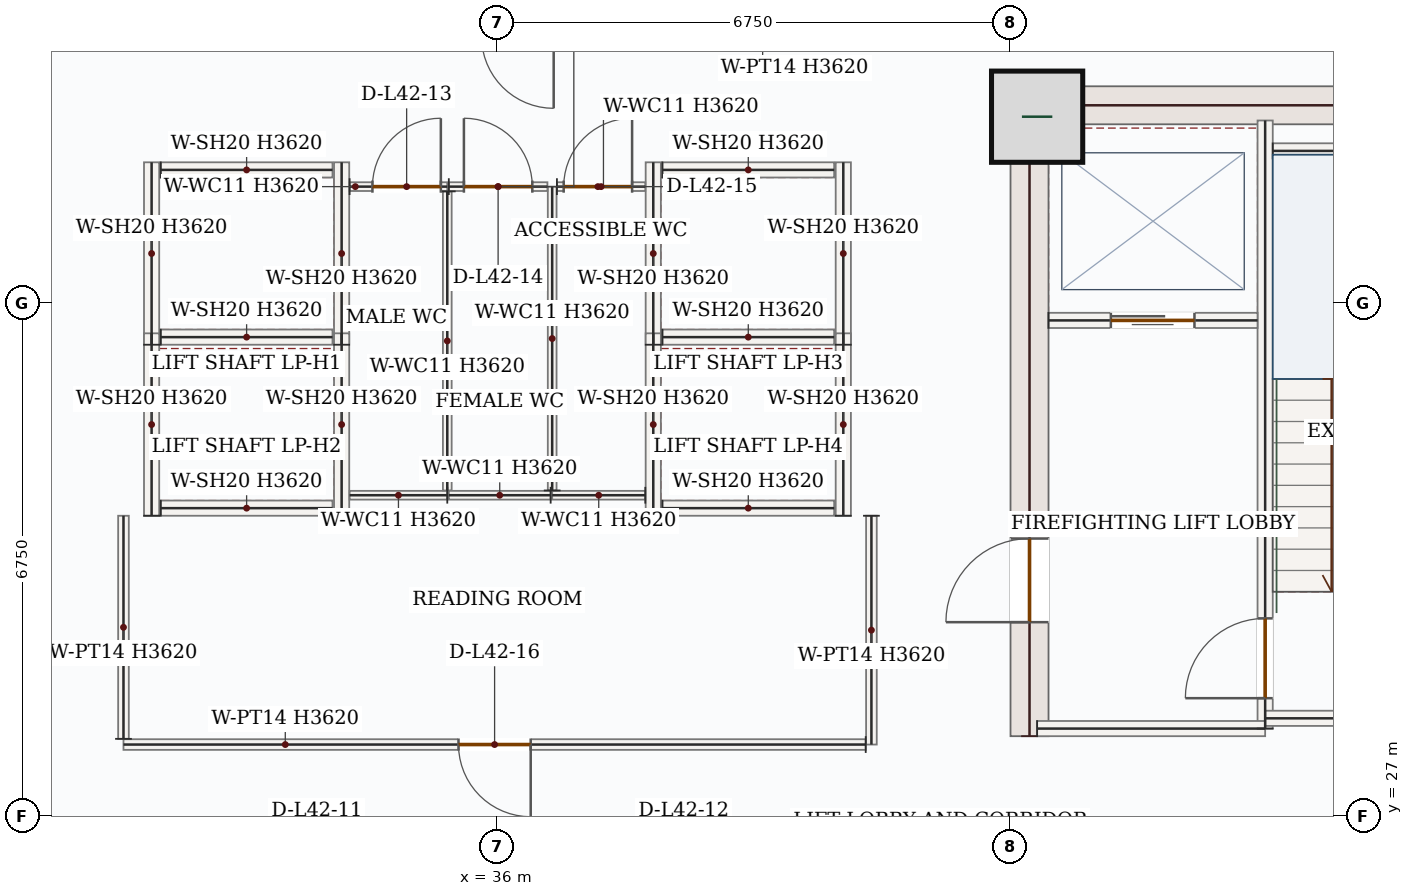
"""IFC4 building model, lengths in metres.
Left out: names, types, materials, properties, quantities, classifications, styles, units other than length and angle.
Written with IfcOpenShell. Run it as: python <this file> out.ifc"""

import sys

from ifc_helpers import new_model, si_unit, direction, frame, frame_2d, origin, origin_2d, place, context, subcontext, project, spatial, rectangle, extrude, source, transform, mapped, element, fill, save


model = new_model("IFC4")
c1 = context("Model", 3, precision=1e-05, world=origin(), true_north=direction((0.0, 1.0)))
c2 = subcontext(c1, "Body", "Model", "MODEL_VIEW")
j1 = project(units=[si_unit("LENGTHUNIT", "METRE"), si_unit("PLANEANGLEUNIT", "RADIAN")], contexts=[c1])
p1 = place(None, origin())
s1 = spatial("IfcSite", under=j1, at=p1, CompositionType="ELEMENT")
p2 = place(p1, origin())
s2 = spatial("IfcBuilding", under=s1, at=p2, CompositionType="ELEMENT")
p3 = place(p2, frame((0.0, 0.0, 182.4)))
s3 = spatial("IfcBuildingStorey", under=s2, at=p3, CompositionType="ELEMENT", Elevation=182.4)
p4 = place(p3, frame((43.0, 28.05, 0.0), z_axis=(0.0, 0.0, 1.0), x_axis=(0.0, 1.0, 0.0)))
e1 = element("IfcWall", 1, at=p4, inside=s3, PredefinedType="SHEAR", context=c2, shape_type="SweptSolid", body=[
    extrude(rectangle(XDim=8.55, YDim=0.5, at=frame_2d((4.275, 0.0))), origin(), (0.0, 0.0, 1.0), 3.62),
])
p5 = place(p4, frame((1.5, 0.0, 0.0)))
e2 = element("IfcOpeningElement", 2, at=p5, cuts=e1, PredefinedType="OPENING", context=c2, shape_type="SweptSolid", body=[
    extrude(rectangle(XDim=1.1, YDim=2.2, at=frame_2d((0.55, 1.1))), frame((0.0, 0.26, 0.0), z_axis=(0.0, -1.0, 0.0), x_axis=(1.0, 0.0, 0.0)), (0.0, 0.0, 1.0), 0.52),
])
m1 = source(origin(), c2, "Body", "SweptSolid", [
    extrude(rectangle(XDim=7.0, YDim=0.5, at=frame_2d((3.5, 0.0))), origin(), (0.0, 0.0, 1.0), 3.62),
])
p6 = place(p3, frame((43.25, 36.35, 0.0), z_axis=(0.0, 0.0, 1.0), x_axis=(1.0, 0.0, 0.0)))
e3 = element("IfcWall", 3, at=p6, inside=s3, PredefinedType="SHEAR", context=c2, shape_type="MappedRepresentation", body=[
    mapped(m1, transform((0.0, 0.0, 0.0), x_axis=(1.0, 0.0, 0.0), y_axis=(0.0, 1.0, 0.0), z_axis=(0.0, 0.0, 1.0), scale=1.0)),
])
m2 = source(origin(), c2, "Body", "SweptSolid", [
    extrude(rectangle(XDim=1.2, YDim=1.2, at=origin_2d()), origin(), (0.0, 0.0, 1.0), 3.9),
])
p7 = place(p3, frame((43.1, 36.2, 0.0), z_axis=(0.0, 0.0, 1.0), x_axis=(1.0, 0.0, 0.0)))
e4 = element("IfcColumn", 4, at=p7, inside=s3, PredefinedType="COLUMN", context=c2, shape_type="MappedRepresentation", body=[
    mapped(m2, transform((0.0, 0.0, 0.0), x_axis=(1.0, 0.0, 0.0), y_axis=(0.0, 1.0, 0.0), z_axis=(0.0, 0.0, 1.0), scale=1.0)),
])
p8 = place(p3, frame((46.1, 28.15, 0.0), z_axis=(0.0, 0.0, 1.0), x_axis=(0.0, 1.0, 0.0)))
e5 = element("IfcWall", 5, at=p8, inside=s3, PredefinedType="SOLIDWALL", context=c2, shape_type="SweptSolid", body=[
    extrude(rectangle(XDim=8.0, YDim=0.2, at=frame_2d((4.0, 0.0))), origin(), (0.0, 0.0, 1.0), 3.62),
])
p9 = place(p8, frame((0.4, 0.0, 0.0)))
e6 = element("IfcOpeningElement", 6, at=p9, cuts=e5, PredefinedType="OPENING", context=c2, shape_type="SweptSolid", body=[
    extrude(rectangle(XDim=1.05, YDim=2.15, at=frame_2d((0.525, 1.075))), frame((0.0, 0.11, 0.0), z_axis=(0.0, -1.0, 0.0), x_axis=(1.0, 0.0, 0.0)), (0.0, 0.0, 1.0), 0.22),
])
m3 = source(origin(), c2, "Body", "SweptSolid", [
    extrude(rectangle(XDim=3.0, YDim=0.2, at=frame_2d((1.5, 0.0))), origin(), (0.0, 0.0, 1.0), 3.62),
])
p10 = place(p3, frame((43.1, 28.15, 0.0), z_axis=(0.0, 0.0, 1.0), x_axis=(1.0, 0.0, 0.0)))
e7 = element("IfcWall", 7, at=p10, inside=s3, PredefinedType="SOLIDWALL", context=c2, shape_type="MappedRepresentation", body=[
    mapped(m3, transform((0.0, 0.0, 0.0), x_axis=(1.0, 0.0, 0.0), y_axis=(0.0, 1.0, 0.0), z_axis=(0.0, 0.0, 1.0), scale=1.0)),
])
m4 = source(origin(), c2, "Body", "SweptSolid", [
    extrude(rectangle(XDim=4.25, YDim=0.2, at=frame_2d((2.125, 0.0))), origin(), (0.0, 0.0, 1.0), 3.62),
])
p11 = place(p3, frame((46.1, 28.285, 0.0), z_axis=(0.0, 0.0, 1.0), x_axis=(1.0, 0.0, 0.0)))
e8 = element("IfcWall", 8, at=p11, inside=s3, PredefinedType="SOLIDWALL", context=c2, shape_type="MappedRepresentation", body=[
    mapped(m4, transform((0.0, 0.0, 0.0), x_axis=(1.0, 0.0, 0.0), y_axis=(0.0, 1.0, 0.0), z_axis=(0.0, 0.0, 1.0), scale=1.0)),
])
m5 = source(origin(), c2, "Body", "SweptSolid", [
    extrude(rectangle(XDim=3.25, YDim=0.2, at=frame_2d((1.625, 0.0))), origin(), (0.0, 0.0, 1.0), 3.62),
])
p12 = place(p3, frame((46.2, 35.75, 0.0), z_axis=(0.0, 0.0, 1.0), x_axis=(1.0, 0.0, 0.0)))
e9 = element("IfcWall", 9, at=p12, inside=s3, PredefinedType="SOLIDWALL", context=c2, shape_type="MappedRepresentation", body=[
    mapped(m5, transform((0.0, 0.0, 0.0), x_axis=(1.0, 0.0, 0.0), y_axis=(0.0, 1.0, 0.0), z_axis=(0.0, 0.0, 1.0), scale=1.0)),
])
p13 = place(p3, frame((43.25, 33.52, 0.0), z_axis=(0.0, 0.0, 1.0), x_axis=(1.0, 0.0, 0.0)))
e10 = element("IfcWall", 10, at=p13, inside=s3, PredefinedType="SOLIDWALL", context=c2, shape_type="SweptSolid", body=[
    extrude(rectangle(XDim=2.75, YDim=0.2, at=frame_2d((1.375, 0.0))), origin(), (0.0, 0.0, 1.0), 3.62),
])
p14 = place(p13, frame((0.82, 0.0, 0.0)))
e11 = element("IfcOpeningElement", 11, at=p14, cuts=e10, PredefinedType="OPENING", context=c2, shape_type="SweptSolid", body=[
    extrude(rectangle(XDim=1.1, YDim=2.15, at=frame_2d((0.55, 1.075))), frame((0.0, 0.11, 0.0), z_axis=(0.0, -1.0, 0.0), x_axis=(1.0, 0.0, 0.0)), (0.0, 0.0, 1.0), 0.22),
])
m6 = source(origin(), c2, "Body", "SweptSolid", [
    extrude(rectangle(XDim=2.4, YDim=0.2, at=frame_2d((1.2, 0.0))), origin(), (0.0, 0.0, 1.0), 3.62),
])
for number, where, z_axis, x_axis in (
    (12, (31.45, 33.2, 0.0), (0.0, 0.0, 1.0), (0.0, 1.0, 0.0)),
    (13, (33.95, 33.2, 0.0), (0.0, 0.0, 1.0), (0.0, 1.0, 0.0)),
):
    element("IfcWall", number, at=place(p3, frame(where, z_axis=z_axis, x_axis=x_axis)), inside=s3, PredefinedType="SOLIDWALL", context=c2, shape_type="MappedRepresentation", body=[
        mapped(m6, transform((0.0, 0.0, 0.0), x_axis=(1.0, 0.0, 0.0), y_axis=(0.0, 1.0, 0.0), z_axis=(0.0, 0.0, 1.0), scale=1.0)),
    ])
m7 = source(origin(), c2, "Body", "SweptSolid", [
    extrude(rectangle(XDim=2.26, YDim=0.2, at=frame_2d((1.13, 0.0))), origin(), (0.0, 0.0, 1.0), 3.62),
])
for number, where, z_axis, x_axis in (
    (14, (31.57, 33.3, 0.0), (0.0, 0.0, 1.0), (1.0, 0.0, 0.0)),
    (15, (31.57, 35.5, 0.0), (0.0, 0.0, 1.0), (1.0, 0.0, 0.0)),
):
    element("IfcWall", number, at=place(p3, frame(where, z_axis=z_axis, x_axis=x_axis)), inside=s3, PredefinedType="SOLIDWALL", context=c2, shape_type="MappedRepresentation", body=[
        mapped(m7, transform((0.0, 0.0, 0.0), x_axis=(1.0, 0.0, 0.0), y_axis=(0.0, 1.0, 0.0), z_axis=(0.0, 0.0, 1.0), scale=1.0)),
    ])
for number, where, z_axis, x_axis in (
    (16, (31.45, 30.95, 0.0), (0.0, 0.0, 1.0), (0.0, 1.0, 0.0)),
    (17, (33.95, 30.95, 0.0), (0.0, 0.0, 1.0), (0.0, 1.0, 0.0)),
):
    element("IfcWall", number, at=place(p3, frame(where, z_axis=z_axis, x_axis=x_axis)), inside=s3, PredefinedType="SOLIDWALL", context=c2, shape_type="MappedRepresentation", body=[
        mapped(m6, transform((0.0, 0.0, 0.0), x_axis=(1.0, 0.0, 0.0), y_axis=(0.0, 1.0, 0.0), z_axis=(0.0, 0.0, 1.0), scale=1.0)),
    ])
p15 = place(p3, frame((31.57, 31.05, 0.0), z_axis=(0.0, 0.0, 1.0), x_axis=(1.0, 0.0, 0.0)))
e18 = element("IfcWall", 18, at=p15, inside=s3, PredefinedType="SOLIDWALL", context=c2, shape_type="MappedRepresentation", body=[
    mapped(m7, transform((0.0, 0.0, 0.0), x_axis=(1.0, 0.0, 0.0), y_axis=(0.0, 1.0, 0.0), z_axis=(0.0, 0.0, 1.0), scale=1.0)),
])
for number, where, z_axis, x_axis in (
    (19, (38.05, 33.2, 0.0), (0.0, 0.0, 1.0), (0.0, 1.0, 0.0)),
    (20, (40.55, 33.2, 0.0), (0.0, 0.0, 1.0), (0.0, 1.0, 0.0)),
):
    element("IfcWall", number, at=place(p3, frame(where, z_axis=z_axis, x_axis=x_axis)), inside=s3, PredefinedType="SOLIDWALL", context=c2, shape_type="MappedRepresentation", body=[
        mapped(m6, transform((0.0, 0.0, 0.0), x_axis=(1.0, 0.0, 0.0), y_axis=(0.0, 1.0, 0.0), z_axis=(0.0, 0.0, 1.0), scale=1.0)),
    ])
for number, where, z_axis, x_axis in (
    (21, (38.17, 33.3, 0.0), (0.0, 0.0, 1.0), (1.0, 0.0, 0.0)),
    (22, (38.17, 35.5, 0.0), (0.0, 0.0, 1.0), (1.0, 0.0, 0.0)),
):
    element("IfcWall", number, at=place(p3, frame(where, z_axis=z_axis, x_axis=x_axis)), inside=s3, PredefinedType="SOLIDWALL", context=c2, shape_type="MappedRepresentation", body=[
        mapped(m7, transform((0.0, 0.0, 0.0), x_axis=(1.0, 0.0, 0.0), y_axis=(0.0, 1.0, 0.0), z_axis=(0.0, 0.0, 1.0), scale=1.0)),
    ])
for number, where, z_axis, x_axis in (
    (23, (38.05, 30.95, 0.0), (0.0, 0.0, 1.0), (0.0, 1.0, 0.0)),
    (24, (40.55, 30.95, 0.0), (0.0, 0.0, 1.0), (0.0, 1.0, 0.0)),
):
    element("IfcWall", number, at=place(p3, frame(where, z_axis=z_axis, x_axis=x_axis)), inside=s3, PredefinedType="SOLIDWALL", context=c2, shape_type="MappedRepresentation", body=[
        mapped(m6, transform((0.0, 0.0, 0.0), x_axis=(1.0, 0.0, 0.0), y_axis=(0.0, 1.0, 0.0), z_axis=(0.0, 0.0, 1.0), scale=1.0)),
    ])
p16 = place(p3, frame((38.17, 31.05, 0.0), z_axis=(0.0, 0.0, 1.0), x_axis=(1.0, 0.0, 0.0)))
e25 = element("IfcWall", 25, at=p16, inside=s3, PredefinedType="SOLIDWALL", context=c2, shape_type="MappedRepresentation", body=[
    mapped(m7, transform((0.0, 0.0, 0.0), x_axis=(1.0, 0.0, 0.0), y_axis=(0.0, 1.0, 0.0), z_axis=(0.0, 0.0, 1.0), scale=1.0)),
])
m8 = source(origin(), c2, "Body", "SweptSolid", [
    extrude(rectangle(XDim=1.225, YDim=0.115, at=frame_2d((0.613, 0.0))), origin(), (0.0, 0.0, 1.0), 3.62),
])
p17 = place(p3, frame((37.945, 31.22, 0.0), z_axis=(0.0, 0.0, 1.0), x_axis=(-1.0, 0.0, 0.0)))
e26 = element("IfcWall", 26, at=p17, inside=s3, PredefinedType="PARTITIONING", context=c2, shape_type="MappedRepresentation", body=[
    mapped(m8, transform((0.0, 0.0, 0.0), x_axis=(1.0, 0.0, 0.0), y_axis=(0.0, 1.0, 0.0), z_axis=(0.0, 0.0, 1.0), scale=1.0)),
])
m9 = source(origin(), c2, "Body", "SweptSolid", [
    extrude(rectangle(XDim=3.998, YDim=0.115, at=frame_2d((1.999, 0.0))), origin(), (0.0, 0.0, 1.0), 3.62),
])
p18 = place(p3, frame((36.72, 31.282, 0.0), z_axis=(0.0, 0.0, 1.0), x_axis=(0.0, 1.0, 0.0)))
e27 = element("IfcWall", 27, at=p18, inside=s3, PredefinedType="PARTITIONING", context=c2, shape_type="MappedRepresentation", body=[
    mapped(m9, transform((0.0, 0.0, 0.0), x_axis=(1.0, 0.0, 0.0), y_axis=(0.0, 1.0, 0.0), z_axis=(0.0, 0.0, 1.0), scale=1.0)),
])
p19 = place(p3, frame((36.782, 35.28, 0.0), z_axis=(0.0, 0.0, 1.0), x_axis=(1.0, 0.0, 0.0)))
e28 = element("IfcWall", 28, at=p19, inside=s3, PredefinedType="PARTITIONING", context=c2, shape_type="SweptSolid", body=[
    extrude(rectangle(XDim=1.163, YDim=0.115, at=frame_2d((0.581, 0.0))), origin(), (0.0, 0.0, 1.0), 3.62),
])
p20 = place(p19, frame((0.089, 0.0, 0.0)))
e29 = element("IfcOpeningElement", 29, at=p20, cuts=e28, PredefinedType="OPENING", context=c2, shape_type="SweptSolid", body=[
    extrude(rectangle(XDim=0.9, YDim=2.1, at=frame_2d((0.45, 1.05))), frame((0.0, 0.067, 0.0), z_axis=(0.0, -1.0, 0.0), x_axis=(1.0, 0.0, 0.0)), (0.0, 0.0, 1.0), 0.135),
])
m10 = source(origin(), c2, "Body", "SweptSolid", [
    extrude(rectangle(XDim=1.285, YDim=0.115, at=frame_2d((0.643, 0.0))), origin(), (0.0, 0.0, 1.0), 3.62),
])
p21 = place(p3, frame((35.34, 31.22, 0.0), z_axis=(0.0, 0.0, 1.0), x_axis=(-1.0, 0.0, 0.0)))
e30 = element("IfcWall", 30, at=p21, inside=s3, PredefinedType="PARTITIONING", context=c2, shape_type="MappedRepresentation", body=[
    mapped(m10, transform((0.0, 0.0, 0.0), x_axis=(1.0, 0.0, 0.0), y_axis=(0.0, 1.0, 0.0), z_axis=(0.0, 0.0, 1.0), scale=1.0)),
])
p22 = place(p3, frame((34.055, 35.28, 0.0), z_axis=(0.0, 0.0, 1.0), x_axis=(1.0, 0.0, 0.0)))
e31 = element("IfcWall", 31, at=p22, inside=s3, PredefinedType="PARTITIONING", context=c2, shape_type="SweptSolid", body=[
    extrude(rectangle(XDim=1.285, YDim=0.115, at=frame_2d((0.643, 0.0))), origin(), (0.0, 0.0, 1.0), 3.62),
])
p23 = place(p22, frame((0.3, 0.0, 0.0)))
e32 = element("IfcOpeningElement", 32, at=p23, cuts=e31, PredefinedType="OPENING", context=c2, shape_type="SweptSolid", body=[
    extrude(rectangle(XDim=0.9, YDim=2.1, at=frame_2d((0.45, 1.05))), frame((0.0, 0.067, 0.0), z_axis=(0.0, -1.0, 0.0), x_axis=(1.0, 0.0, 0.0)), (0.0, 0.0, 1.0), 0.135),
])
m11 = source(origin(), c2, "Body", "SweptSolid", [
    extrude(rectangle(XDim=3.935, YDim=0.115, at=frame_2d((1.968, 0.0))), origin(), (0.0, 0.0, 1.0), 3.62),
])
p24 = place(p3, frame((35.34, 35.218, 0.0), z_axis=(0.0, 0.0, 1.0), x_axis=(0.0, -1.0, 0.0)))
e33 = element("IfcWall", 33, at=p24, inside=s3, PredefinedType="PARTITIONING", context=c2, shape_type="MappedRepresentation", body=[
    mapped(m11, transform((0.0, 0.0, 0.0), x_axis=(1.0, 0.0, 0.0), y_axis=(0.0, 1.0, 0.0), z_axis=(0.0, 0.0, 1.0), scale=1.0)),
])
m12 = source(origin(), c2, "Body", "SweptSolid", [
    extrude(rectangle(XDim=1.34, YDim=0.115, at=frame_2d((0.67, 0.0))), origin(), (0.0, 0.0, 1.0), 3.62),
])
p25 = place(p3, frame((36.7, 31.22, 0.0), z_axis=(0.0, 0.0, 1.0), x_axis=(-1.0, 0.0, 0.0)))
e34 = element("IfcWall", 34, at=p25, inside=s3, PredefinedType="PARTITIONING", context=c2, shape_type="MappedRepresentation", body=[
    mapped(m12, transform((0.0, 0.0, 0.0), x_axis=(1.0, 0.0, 0.0), y_axis=(0.0, 1.0, 0.0), z_axis=(0.0, 0.0, 1.0), scale=1.0)),
])
p26 = place(p3, frame((35.36, 35.28, 0.0), z_axis=(0.0, 0.0, 1.0), x_axis=(1.0, 0.0, 0.0)))
e35 = element("IfcWall", 35, at=p26, inside=s3, PredefinedType="PARTITIONING", context=c2, shape_type="SweptSolid", body=[
    extrude(rectangle(XDim=1.297, YDim=0.115, at=frame_2d((0.649, 0.0))), origin(), (0.0, 0.0, 1.0), 3.62),
])
p27 = place(p26, frame((0.199, 0.0, 0.0)))
e36 = element("IfcOpeningElement", 36, at=p27, cuts=e35, PredefinedType="OPENING", context=c2, shape_type="SweptSolid", body=[
    extrude(rectangle(XDim=0.9, YDim=2.1, at=frame_2d((0.45, 1.05))), frame((0.0, 0.067, 0.0), z_axis=(0.0, -1.0, 0.0), x_axis=(1.0, 0.0, 0.0)), (0.0, 0.0, 1.0), 0.135),
])
m13 = source(origin(), c2, "Body", "SweptSolid", [
    extrude(rectangle(XDim=3.01, YDim=0.14, at=frame_2d((1.505, 0.0))), origin(), (0.0, 0.0, 1.0), 3.62),
])
p28 = place(p3, frame((40.92, 30.95, 0.0), z_axis=(0.0, 0.0, 1.0), x_axis=(0.0, -1.0, 0.0)))
e37 = element("IfcWall", 37, at=p28, inside=s3, PredefinedType="PARTITIONING", context=c2, shape_type="MappedRepresentation", body=[
    mapped(m13, transform((0.0, 0.0, 0.0), x_axis=(1.0, 0.0, 0.0), y_axis=(0.0, 1.0, 0.0), z_axis=(0.0, 0.0, 1.0), scale=1.0)),
])
p29 = place(p3, frame((40.845, 27.94, 0.0), z_axis=(0.0, 0.0, 1.0), x_axis=(-1.0, 0.0, 0.0)))
e38 = element("IfcWall", 38, at=p29, inside=s3, PredefinedType="PARTITIONING", context=c2, shape_type="SweptSolid", body=[
    extrude(rectangle(XDim=9.765, YDim=0.14, at=frame_2d((4.882, 0.0))), origin(), (0.0, 0.0, 1.0), 3.62),
])
p30 = place(p29, frame((4.407, 0.0, 0.0)))
e39 = element("IfcOpeningElement", 39, at=p30, cuts=e38, PredefinedType="OPENING", context=c2, shape_type="SweptSolid", body=[
    extrude(rectangle(XDim=0.95, YDim=2.15, at=frame_2d((0.475, 1.075))), frame((0.0, 0.08, 0.0), z_axis=(0.0, -1.0, 0.0), x_axis=(1.0, 0.0, 0.0)), (0.0, 0.0, 1.0), 0.16),
])
m14 = source(origin(), c2, "Body", "SweptSolid", [
    extrude(rectangle(XDim=2.935, YDim=0.14, at=frame_2d((1.468, 0.0))), origin(), (0.0, 0.0, 1.0), 3.62),
])
p31 = place(p3, frame((31.08, 28.015, 0.0), z_axis=(0.0, 0.0, 1.0), x_axis=(0.0, 1.0, 0.0)))
e40 = element("IfcWall", 40, at=p31, inside=s3, PredefinedType="PARTITIONING", context=c2, shape_type="MappedRepresentation", body=[
    mapped(m14, transform((0.0, 0.0, 0.0), x_axis=(1.0, 0.0, 0.0), y_axis=(0.0, 1.0, 0.0), z_axis=(0.0, 0.0, 1.0), scale=1.0)),
])
m15 = source(origin(), c2, "Body", "SweptSolid", [
    extrude(rectangle(XDim=1.05, YDim=2.15, at=frame_2d((0.525, 1.075))), frame((0.0, 0.025, 0.0), z_axis=(0.0, -1.0, 0.0), x_axis=(1.0, 0.0, 0.0)), (0.0, 0.0, 1.0), 0.05),
])
p32 = place(p9, origin())
e41 = element("IfcDoor", 41, at=p32, inside=s3, OperationType="SINGLE_SWING_LEFT", PredefinedType="DOOR", context=c2, shape_type="MappedRepresentation", body=[
    mapped(m15, transform((0.0, 0.0, 0.0), x_axis=(1.0, 0.0, 0.0), y_axis=(0.0, 1.0, 0.0), z_axis=(0.0, 0.0, 1.0), scale=1.0)),
])
fill(e6, e41)
m16 = source(origin(), c2, "Body", "SweptSolid", [
    extrude(rectangle(XDim=1.1, YDim=2.15, at=frame_2d((0.55, 1.075))), frame((0.0, 0.025, 0.0), z_axis=(0.0, -1.0, 0.0), x_axis=(1.0, 0.0, 0.0)), (0.0, 0.0, 1.0), 0.05),
])
p33 = place(p14, origin())
e42 = element("IfcDoor", 42, at=p33, inside=s3, OperationType="DOUBLE_DOOR_SLIDING", PredefinedType="DOOR", context=c2, shape_type="MappedRepresentation", body=[
    mapped(m16, transform((0.0, 0.0, 0.0), x_axis=(1.0, 0.0, 0.0), y_axis=(0.0, 1.0, 0.0), z_axis=(0.0, 0.0, 1.0), scale=1.0)),
])
fill(e11, e42)
m17 = source(origin(), c2, "Body", "SweptSolid", [
    extrude(rectangle(XDim=1.1, YDim=2.2, at=frame_2d((0.55, 1.1))), frame((0.0, 0.025, 0.0), z_axis=(0.0, -1.0, 0.0), x_axis=(1.0, 0.0, 0.0)), (0.0, 0.0, 1.0), 0.05),
])
p34 = place(p5, origin())
e43 = element("IfcDoor", 43, at=p34, inside=s3, OperationType="SINGLE_SWING_LEFT", PredefinedType="DOOR", context=c2, shape_type="MappedRepresentation", body=[
    mapped(m17, transform((0.0, 0.0, 0.0), x_axis=(1.0, 0.0, 0.0), y_axis=(0.0, 1.0, 0.0), z_axis=(0.0, 0.0, 1.0), scale=1.0)),
])
fill(e2, e43)
m18 = source(origin(), c2, "Body", "SweptSolid", [
    extrude(rectangle(XDim=0.9, YDim=2.1, at=frame_2d((0.45, 1.05))), frame((0.0, 0.025, 0.0), z_axis=(0.0, -1.0, 0.0), x_axis=(1.0, 0.0, 0.0)), (0.0, 0.0, 1.0), 0.05),
])
p35 = place(p23, origin())
e44 = element("IfcDoor", 44, at=p35, inside=s3, OperationType="SINGLE_SWING_RIGHT", PredefinedType="DOOR", context=c2, shape_type="MappedRepresentation", body=[
    mapped(m18, transform((0.0, 0.0, 0.0), x_axis=(1.0, 0.0, 0.0), y_axis=(0.0, 1.0, 0.0), z_axis=(0.0, 0.0, 1.0), scale=1.0)),
])
fill(e32, e44)
p36 = place(p27, origin())
e45 = element("IfcDoor", 45, at=p36, inside=s3, OperationType="SINGLE_SWING_LEFT", PredefinedType="DOOR", context=c2, shape_type="MappedRepresentation", body=[
    mapped(m18, transform((0.0, 0.0, 0.0), x_axis=(1.0, 0.0, 0.0), y_axis=(0.0, 1.0, 0.0), z_axis=(0.0, 0.0, 1.0), scale=1.0)),
])
fill(e36, e45)
p37 = place(p20, origin())
e46 = element("IfcDoor", 46, at=p37, inside=s3, OperationType="SINGLE_SWING_RIGHT", PredefinedType="DOOR", context=c2, shape_type="MappedRepresentation", body=[
    mapped(m18, transform((0.0, 0.0, 0.0), x_axis=(1.0, 0.0, 0.0), y_axis=(0.0, 1.0, 0.0), z_axis=(0.0, 0.0, 1.0), scale=1.0)),
])
fill(e29, e46)
m19 = source(origin(), c2, "Body", "SweptSolid", [
    extrude(rectangle(XDim=0.95, YDim=2.15, at=frame_2d((0.475, 1.075))), frame((0.0, 0.025, 0.0), z_axis=(0.0, -1.0, 0.0), x_axis=(1.0, 0.0, 0.0)), (0.0, 0.0, 1.0), 0.05),
])
p38 = place(p30, origin())
e47 = element("IfcDoor", 47, at=p38, inside=s3, OperationType="SINGLE_SWING_LEFT", PredefinedType="DOOR", context=c2, shape_type="MappedRepresentation", body=[
    mapped(m19, transform((0.0, 0.0, 0.0), x_axis=(1.0, 0.0, 0.0), y_axis=(0.0, 1.0, 0.0), z_axis=(0.0, 0.0, 1.0), scale=1.0)),
])
fill(e39, e47)
save(model, sys.argv[1])
